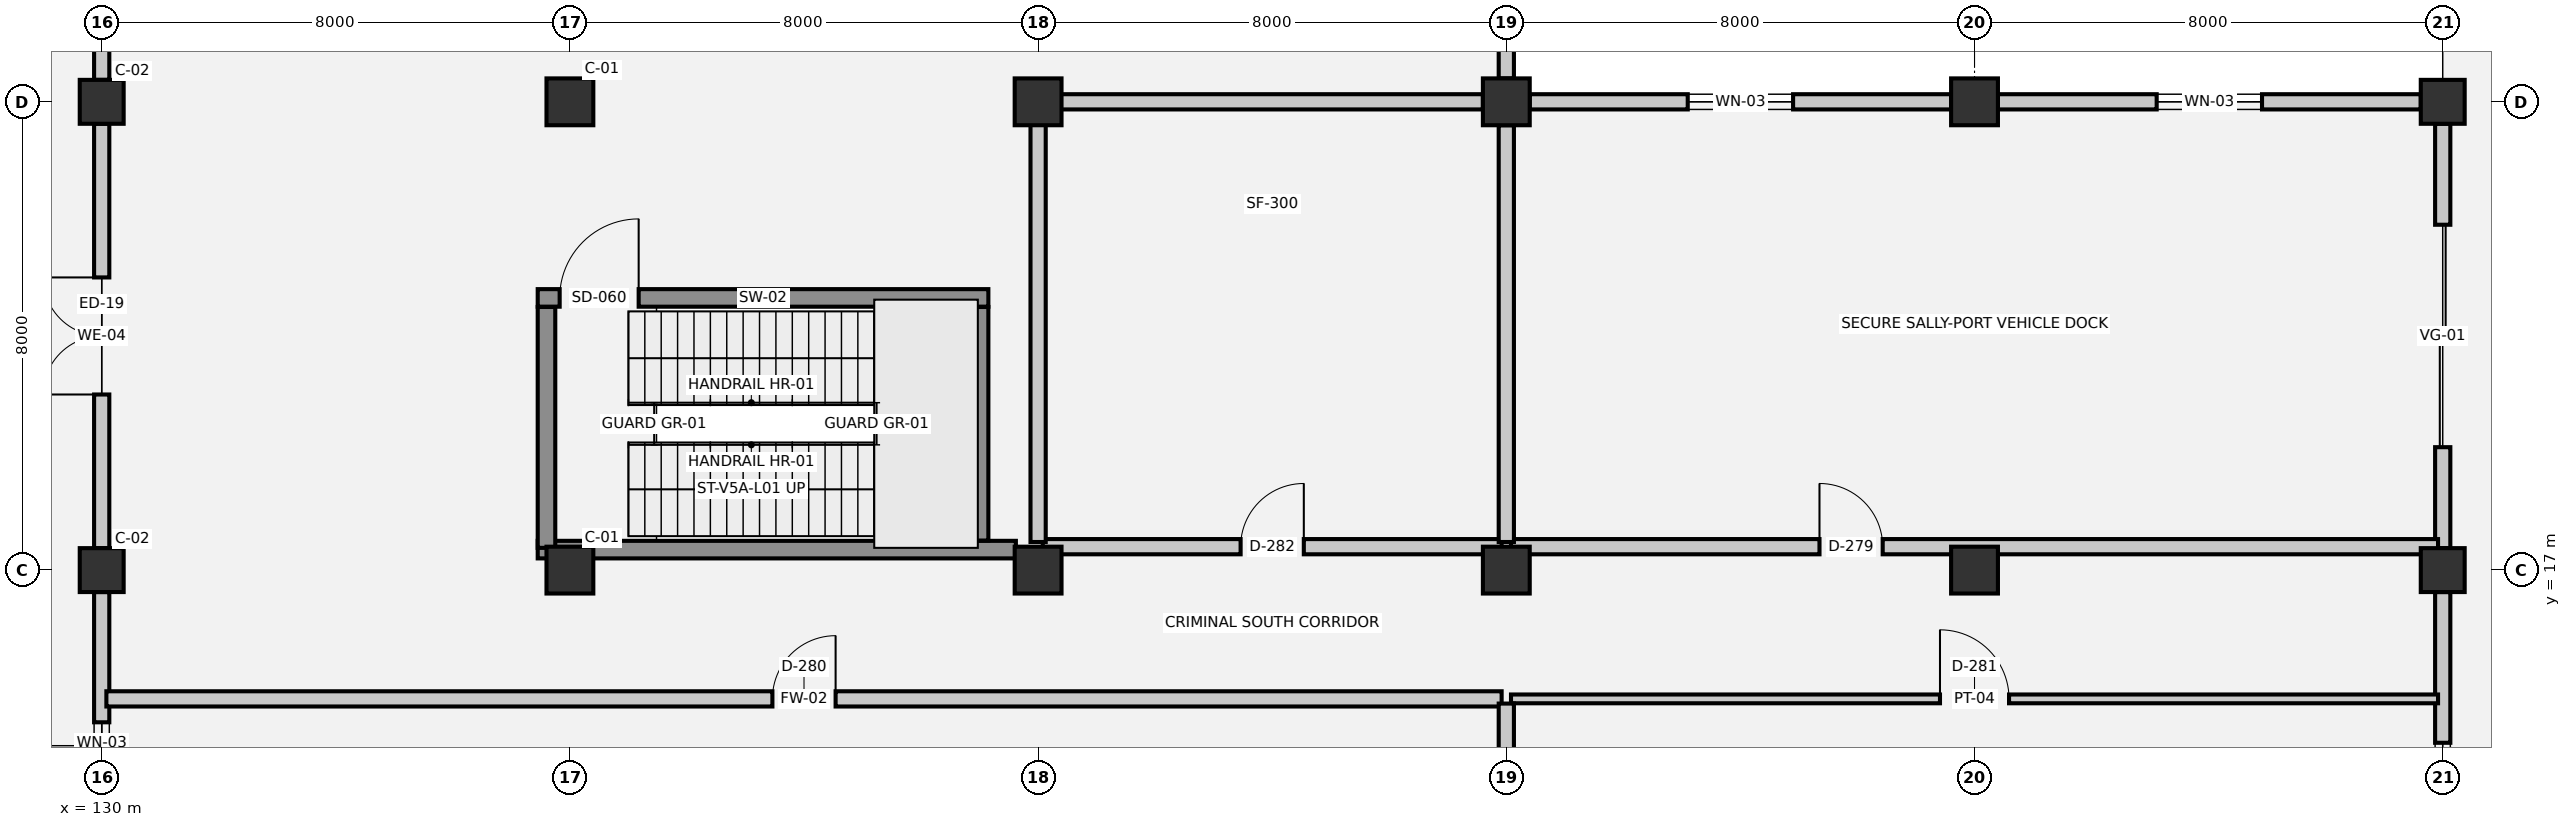
"""IFC4 building model, lengths in metres.
Left out: names, types, materials, properties, quantities, classifications, styles, units other than length and angle.
Written with IfcOpenShell. Run it as: python <this file> out.ifc"""

import sys

from ifc_helpers import new_model, si_unit, direction, frame, frame_2d, origin, origin_2d, place, context, subcontext, project, spatial, rectangle, extrude, element, fill, save


model = new_model("IFC4")
c1 = context("Model", 3, precision=1e-05, world=origin(), true_north=direction((0.0, 1.0)))
c2 = subcontext(c1, "Body", "Model", "MODEL_VIEW")
j1 = project(units=[si_unit("LENGTHUNIT", "METRE"), si_unit("PLANEANGLEUNIT", "RADIAN")], contexts=[c1])
p1 = place(None, origin())
s1 = spatial("IfcSite", under=j1, at=p1, CompositionType="ELEMENT")
p2 = place(p1, origin())
s2 = spatial("IfcBuilding", under=s1, at=p2, CompositionType="ELEMENT")
p3 = place(p2, origin())
s3 = spatial("IfcBuildingStorey", under=s2, at=p3, CompositionType="ELEMENT", Elevation=0.0)
for number, where, z_axis, x_axis in (
    (1, (130.0, 17.0, 0.0), (0.0, 0.0, 1.0), (1.0, 0.0, 0.0)),
    (2, (130.0, 25.0, 0.0), (0.0, 0.0, 1.0), (1.0, 0.0, 0.0)),
):
    element("IfcColumn", number, at=place(p3, frame(where, z_axis=z_axis, x_axis=x_axis)), inside=s3, PredefinedType="COLUMN", context=c2, shape_type="SweptSolid", body=[
        extrude(rectangle(XDim=0.75, YDim=0.75, at=origin_2d()), origin(), (0.0, 0.0, 1.0), 5.4),
    ])
for number, where, z_axis, x_axis in (
    (3, (138.0, 17.0, 0.0), (0.0, 0.0, 1.0), (1.0, 0.0, 0.0)),
    (4, (138.0, 25.0, 0.0), (0.0, 0.0, 1.0), (1.0, 0.0, 0.0)),
    (5, (146.0, 17.0, 0.0), (0.0, 0.0, 1.0), (1.0, 0.0, 0.0)),
    (6, (146.0, 25.0, 0.0), (0.0, 0.0, 1.0), (1.0, 0.0, 0.0)),
    (7, (154.0, 17.0, 0.0), (0.0, 0.0, 1.0), (1.0, 0.0, 0.0)),
    (8, (154.0, 25.0, 0.0), (0.0, 0.0, 1.0), (1.0, 0.0, 0.0)),
    (9, (162.0, 17.0, 0.0), (0.0, 0.0, 1.0), (1.0, 0.0, 0.0)),
    (10, (162.0, 25.0, 0.0), (0.0, 0.0, 1.0), (1.0, 0.0, 0.0)),
):
    element("IfcColumn", number, at=place(p3, frame(where, z_axis=z_axis, x_axis=x_axis)), inside=s3, PredefinedType="COLUMN", context=c2, shape_type="SweptSolid", body=[
        extrude(rectangle(XDim=0.8, YDim=0.8, at=origin_2d()), origin(), (0.0, 0.0, 1.0), 5.4),
    ])
for number, where, z_axis, x_axis in (
    (11, (170.0, 17.0, 0.0), (0.0, 0.0, 1.0), (1.0, 0.0, 0.0)),
    (12, (170.0, 25.0, 0.0), (0.0, 0.0, 1.0), (1.0, 0.0, 0.0)),
):
    element("IfcColumn", number, at=place(p3, frame(where, z_axis=z_axis, x_axis=x_axis)), inside=s3, PredefinedType="COLUMN", context=c2, shape_type="SweptSolid", body=[
        extrude(rectangle(XDim=0.75, YDim=0.75, at=origin_2d()), origin(), (0.0, 0.0, 1.0), 5.4),
    ])
p4 = place(p3, frame((130.0, 10.375, 0.0), z_axis=(0.0, 0.0, 1.0), x_axis=(0.0, 1.0, 0.0)))
e13 = element("IfcWall", 13, at=p4, inside=s3, PredefinedType="SOLIDWALL", context=c2, shape_type="SweptSolid", body=[
    extrude(rectangle(XDim=6.25, YDim=0.26, at=frame_2d((3.125, 0.0))), origin(), (0.0, 0.0, 1.0), 4.13),
])
p5 = place(p4, frame((2.225, 0.0, 0.9)))
e14 = element("IfcOpeningElement", 14, at=p5, cuts=e13, PredefinedType="OPENING", context=c2, shape_type="SweptSolid", body=[
    extrude(rectangle(XDim=1.8, YDim=2.0, at=frame_2d((0.9, 1.0))), frame((0.0, 0.14, 0.0), z_axis=(0.0, -1.0, 0.0), x_axis=(1.0, 0.0, 0.0)), (0.0, 0.0, 1.0), 0.28),
])
p6 = place(p3, frame((130.0, 17.375, 0.0), z_axis=(0.0, 0.0, 1.0), x_axis=(0.0, 1.0, 0.0)))
e15 = element("IfcWall", 15, at=p6, inside=s3, PredefinedType="SOLIDWALL", context=c2, shape_type="SweptSolid", body=[
    extrude(rectangle(XDim=7.25, YDim=0.26, at=frame_2d((3.625, 0.0))), origin(), (0.0, 0.0, 1.0), 4.13),
])
p7 = place(p6, frame((2.625, 0.0, 0.0)))
e16 = element("IfcOpeningElement", 16, at=p7, cuts=e15, PredefinedType="OPENING", context=c2, shape_type="SweptSolid", body=[
    extrude(rectangle(XDim=2.0, YDim=2.3, at=frame_2d((1.0, 1.15))), frame((0.0, 0.14, 0.0), z_axis=(0.0, -1.0, 0.0), x_axis=(1.0, 0.0, 0.0)), (0.0, 0.0, 1.0), 0.28),
])
p8 = place(p3, frame((130.0, 25.375, 0.0), z_axis=(0.0, 0.0, 1.0), x_axis=(0.0, 1.0, 0.0)))
e17 = element("IfcWall", 17, at=p8, inside=s3, PredefinedType="SOLIDWALL", context=c2, shape_type="SweptSolid", body=[
    extrude(rectangle(XDim=6.25, YDim=0.26, at=frame_2d((3.125, 0.0))), origin(), (0.0, 0.0, 1.0), 4.13),
])
p9 = place(p8, frame((2.225, 0.0, 0.9)))
e18 = element("IfcOpeningElement", 18, at=p9, cuts=e17, PredefinedType="OPENING", context=c2, shape_type="SweptSolid", body=[
    extrude(rectangle(XDim=1.8, YDim=2.0, at=frame_2d((0.9, 1.0))), frame((0.0, 0.14, 0.0), z_axis=(0.0, -1.0, 0.0), x_axis=(1.0, 0.0, 0.0)), (0.0, 0.0, 1.0), 0.28),
])
p10 = place(p3, frame((154.0, 31.6, 0.0), z_axis=(0.0, 0.0, 1.0), x_axis=(0.0, -1.0, 0.0)))
e19 = element("IfcWall", 19, at=p10, inside=s3, PredefinedType="SOLIDWALL", context=c2, shape_type="SweptSolid", body=[
    extrude(rectangle(XDim=6.2, YDim=0.26, at=frame_2d((3.1, 0.0))), origin(), (0.0, 0.0, 1.0), 4.13),
])
p11 = place(p10, frame((2.55, 0.0, 1.0)))
e20 = element("IfcOpeningElement", 20, at=p11, cuts=e19, PredefinedType="OPENING", context=c2, shape_type="SweptSolid", body=[
    extrude(rectangle(XDim=1.1, YDim=1.2, at=frame_2d((0.55, 0.6))), frame((0.0, 0.14, 0.0), z_axis=(0.0, -1.0, 0.0), x_axis=(1.0, 0.0, 0.0)), (0.0, 0.0, 1.0), 0.28),
])
p12 = place(p3, frame((154.4, 25.0, 0.0), z_axis=(0.0, 0.0, 1.0), x_axis=(1.0, 0.0, 0.0)))
e21 = element("IfcWall", 21, at=p12, inside=s3, PredefinedType="SOLIDWALL", context=c2, shape_type="SweptSolid", body=[
    extrude(rectangle(XDim=7.2, YDim=0.26, at=frame_2d((3.6, 0.0))), origin(), (0.0, 0.0, 1.0), 4.13),
])
p13 = place(p12, frame((2.7, 0.0, 0.9)))
e22 = element("IfcOpeningElement", 22, at=p13, cuts=e21, PredefinedType="OPENING", context=c2, shape_type="SweptSolid", body=[
    extrude(rectangle(XDim=1.8, YDim=2.0, at=frame_2d((0.9, 1.0))), frame((0.0, 0.14, 0.0), z_axis=(0.0, -1.0, 0.0), x_axis=(1.0, 0.0, 0.0)), (0.0, 0.0, 1.0), 0.28),
])
p14 = place(p3, frame((162.4, 25.0, 0.0), z_axis=(0.0, 0.0, 1.0), x_axis=(1.0, 0.0, 0.0)))
e23 = element("IfcWall", 23, at=p14, inside=s3, PredefinedType="SOLIDWALL", context=c2, shape_type="SweptSolid", body=[
    extrude(rectangle(XDim=7.225, YDim=0.26, at=frame_2d((3.613, 0.0))), origin(), (0.0, 0.0, 1.0), 4.13),
])
p15 = place(p14, frame((2.712, 0.0, 0.9)))
e24 = element("IfcOpeningElement", 24, at=p15, cuts=e23, PredefinedType="OPENING", context=c2, shape_type="SweptSolid", body=[
    extrude(rectangle(XDim=1.8, YDim=2.0, at=frame_2d((0.9, 1.0))), frame((0.0, 0.14, 0.0), z_axis=(0.0, -1.0, 0.0), x_axis=(1.0, 0.0, 0.0)), (0.0, 0.0, 1.0), 0.28),
])
p16 = place(p3, frame((170.0, 24.625, 0.0), z_axis=(0.0, 0.0, 1.0), x_axis=(0.0, -1.0, 0.0)))
e25 = element("IfcWall", 25, at=p16, inside=s3, PredefinedType="SOLIDWALL", context=c2, shape_type="SweptSolid", body=[
    extrude(rectangle(XDim=7.25, YDim=0.26, at=frame_2d((3.625, 0.0))), origin(), (0.0, 0.0, 1.0), 4.13),
])
p17 = place(p16, frame((1.725, 0.0, 0.0)))
e26 = element("IfcOpeningElement", 26, at=p17, cuts=e25, PredefinedType="OPENING", context=c2, shape_type="SweptSolid", body=[
    extrude(rectangle(XDim=3.8, YDim=3.6, at=frame_2d((1.9, 1.8))), frame((0.0, 0.14, 0.0), z_axis=(0.0, -1.0, 0.0), x_axis=(1.0, 0.0, 0.0)), (0.0, 0.0, 1.0), 0.28),
])
p18 = place(p3, frame((170.0, 16.625, 0.0), z_axis=(0.0, 0.0, 1.0), x_axis=(0.0, -1.0, 0.0)))
e27 = element("IfcWall", 27, at=p18, inside=s3, PredefinedType="SOLIDWALL", context=c2, shape_type="SweptSolid", body=[
    extrude(rectangle(XDim=6.25, YDim=0.26, at=frame_2d((3.125, 0.0))), origin(), (0.0, 0.0, 1.0), 4.13),
])
p19 = place(p18, frame((2.575, 0.0, 1.0)))
e28 = element("IfcOpeningElement", 28, at=p19, cuts=e27, PredefinedType="OPENING", context=c2, shape_type="SweptSolid", body=[
    extrude(rectangle(XDim=1.1, YDim=1.2, at=frame_2d((0.55, 0.6))), frame((0.0, 0.14, 0.0), z_axis=(0.0, -1.0, 0.0), x_axis=(1.0, 0.0, 0.0)), (0.0, 0.0, 1.0), 0.28),
])
p20 = place(p3, frame((137.45, 21.65, 0.0), z_axis=(0.0, 0.0, 1.0), x_axis=(1.0, 0.0, 0.0)))
e29 = element("IfcWall", 29, at=p20, inside=s3, PredefinedType="SHEAR", context=c2, shape_type="SweptSolid", body=[
    extrude(rectangle(XDim=7.7, YDim=0.3, at=frame_2d((3.85, 0.0))), origin(), (0.0, 0.0, 1.0), 5.1),
])
p21 = place(p20, frame((0.375, 0.0, 0.0)))
e30 = element("IfcOpeningElement", 30, at=p21, cuts=e29, PredefinedType="OPENING", context=c2, shape_type="SweptSolid", body=[
    extrude(rectangle(XDim=1.35, YDim=2.2, at=frame_2d((0.675, 1.1))), frame((0.0, 0.16, 0.0), z_axis=(0.0, -1.0, 0.0), x_axis=(1.0, 0.0, 0.0)), (0.0, 0.0, 1.0), 0.32),
])
p22 = place(p3, frame((137.45, 17.35, 0.0), z_axis=(0.0, 0.0, 1.0), x_axis=(1.0, 0.0, 0.0)))
e31 = element("IfcWall", 31, at=p22, inside=s3, PredefinedType="SHEAR", context=c2, shape_type="SweptSolid", body=[
    extrude(rectangle(XDim=8.17, YDim=0.3, at=frame_2d((4.085, 0.0))), origin(), (0.0, 0.0, 1.0), 5.1),
])
p23 = place(p3, frame((137.6, 21.495, 0.0), z_axis=(0.0, 0.0, 1.0), x_axis=(0.0, -1.0, 0.0)))
e32 = element("IfcWall", 32, at=p23, inside=s3, PredefinedType="SHEAR", context=c2, shape_type="SweptSolid", body=[
    extrude(rectangle(XDim=4.115, YDim=0.3, at=frame_2d((2.058, 0.0))), origin(), (0.0, 0.0, 1.0), 5.1),
])
p24 = place(p3, frame((145.0, 17.505, 0.0), z_axis=(0.0, 0.0, 1.0), x_axis=(0.0, 1.0, 0.0)))
e33 = element("IfcWall", 33, at=p24, inside=s3, PredefinedType="SHEAR", context=c2, shape_type="SweptSolid", body=[
    extrude(rectangle(XDim=3.99, YDim=0.3, at=frame_2d((1.995, 0.0))), origin(), (0.0, 0.0, 1.0), 5.1),
])
p25 = place(p3, frame((130.08, 14.8, 0.0), z_axis=(0.0, 0.0, 1.0), x_axis=(1.0, 0.0, 0.0)))
e34 = element("IfcWall", 34, at=p25, inside=s3, PredefinedType="SOLIDWALL", context=c2, shape_type="SweptSolid", body=[
    extrude(rectangle(XDim=23.84, YDim=0.26, at=frame_2d((11.92, 0.0))), origin(), (0.0, 0.0, 1.0), 5.04),
])
p26 = place(p25, frame((11.38, 0.0, 0.0)))
e35 = element("IfcOpeningElement", 35, at=p26, cuts=e34, PredefinedType="OPENING", context=c2, shape_type="SweptSolid", body=[
    extrude(rectangle(XDim=1.08, YDim=2.1, at=frame_2d((0.54, 1.05))), frame((0.0, 0.14, 0.0), z_axis=(0.0, -1.0, 0.0), x_axis=(1.0, 0.0, 0.0)), (0.0, 0.0, 1.0), 0.28),
])
p27 = place(p3, frame((154.08, 14.8, 0.0), z_axis=(0.0, 0.0, 1.0), x_axis=(1.0, 0.0, 0.0)))
e36 = element("IfcWall", 36, at=p27, inside=s3, PredefinedType="PARTITIONING", context=c2, shape_type="SweptSolid", body=[
    extrude(rectangle(XDim=15.84, YDim=0.15, at=frame_2d((7.92, 0.0))), origin(), (0.0, 0.0, 1.0), 5.04),
])
p28 = place(p27, frame((7.33, 0.0, 0.0)))
e37 = element("IfcOpeningElement", 37, at=p28, cuts=e36, PredefinedType="OPENING", context=c2, shape_type="SweptSolid", body=[
    extrude(rectangle(XDim=1.18, YDim=2.2, at=frame_2d((0.59, 1.1))), frame((0.0, 0.085, 0.0), z_axis=(0.0, -1.0, 0.0), x_axis=(1.0, 0.0, 0.0)), (0.0, 0.0, 1.0), 0.17),
])
p29 = place(p3, frame((146.08, 17.4, 0.0), z_axis=(0.0, 0.0, 1.0), x_axis=(1.0, 0.0, 0.0)))
e38 = element("IfcWall", 38, at=p29, inside=s3, PredefinedType="SOLIDWALL", context=c2, shape_type="SweptSolid", body=[
    extrude(rectangle(XDim=7.84, YDim=0.26, at=frame_2d((3.92, 0.0))), origin(), (0.0, 0.0, 1.0), 5.04),
])
p30 = place(p29, frame((3.38, 0.0, 0.0)))
e39 = element("IfcOpeningElement", 39, at=p30, cuts=e38, PredefinedType="OPENING", context=c2, shape_type="SweptSolid", body=[
    extrude(rectangle(XDim=1.08, YDim=2.1, at=frame_2d((0.54, 1.05))), frame((0.0, 0.14, 0.0), z_axis=(0.0, -1.0, 0.0), x_axis=(1.0, 0.0, 0.0)), (0.0, 0.0, 1.0), 0.28),
])
p31 = place(p3, frame((154.08, 17.4, 0.0), z_axis=(0.0, 0.0, 1.0), x_axis=(1.0, 0.0, 0.0)))
e40 = element("IfcWall", 40, at=p31, inside=s3, PredefinedType="SOLIDWALL", context=c2, shape_type="SweptSolid", body=[
    extrude(rectangle(XDim=15.84, YDim=0.26, at=frame_2d((7.92, 0.0))), origin(), (0.0, 0.0, 1.0), 5.04),
])
p32 = place(p31, frame((5.271, 0.0, 0.0)))
e41 = element("IfcOpeningElement", 41, at=p32, cuts=e40, PredefinedType="OPENING", context=c2, shape_type="SweptSolid", body=[
    extrude(rectangle(XDim=1.08, YDim=2.1, at=frame_2d((0.54, 1.05))), frame((0.0, 0.14, 0.0), z_axis=(0.0, -1.0, 0.0), x_axis=(1.0, 0.0, 0.0)), (0.0, 0.0, 1.0), 0.28),
])
p33 = place(p3, frame((146.08, 25.0, 0.0), z_axis=(0.0, 0.0, 1.0), x_axis=(1.0, 0.0, 0.0)))
e42 = element("IfcWall", 42, at=p33, inside=s3, PredefinedType="SOLIDWALL", context=c2, shape_type="SweptSolid", body=[
    extrude(rectangle(XDim=7.52, YDim=0.26, at=frame_2d((3.76, 0.0))), origin(), (0.0, 0.0, 1.0), 4.35),
])
p34 = place(p3, frame((146.0, 17.48, 0.0), z_axis=(0.0, 0.0, 1.0), x_axis=(0.0, 1.0, 0.0)))
e43 = element("IfcWall", 43, at=p34, inside=s3, PredefinedType="SOLIDWALL", context=c2, shape_type="SweptSolid", body=[
    extrude(rectangle(XDim=7.44, YDim=0.26, at=frame_2d((3.72, 0.0))), origin(), (0.0, 0.0, 1.0), 4.2),
])
p35 = place(p3, frame((154.0, 4.08, 0.0), z_axis=(0.0, 0.0, 1.0), x_axis=(0.0, 1.0, 0.0)))
e44 = element("IfcWall", 44, at=p35, inside=s3, PredefinedType="SOLIDWALL", context=c2, shape_type="SweptSolid", body=[
    extrude(rectangle(XDim=10.64, YDim=0.26, at=frame_2d((5.32, 0.0))), origin(), (0.0, 0.0, 1.0), 4.45),
])
p36 = place(p3, frame((154.0, 17.48, 0.0), z_axis=(0.0, 0.0, 1.0), x_axis=(0.0, 1.0, 0.0)))
e45 = element("IfcWall", 45, at=p36, inside=s3, PredefinedType="SOLIDWALL", context=c2, shape_type="SweptSolid", body=[
    extrude(rectangle(XDim=7.12, YDim=0.26, at=frame_2d((3.56, 0.0))), origin(), (0.0, 0.0, 1.0), 4.2),
])
p37 = place(p5, origin())
e46 = element("IfcWindow", 46, at=p37, inside=s3, PartitioningType="SINGLE_PANEL", PredefinedType="WINDOW", context=c2, shape_type="SweptSolid", body=[
    extrude(rectangle(XDim=1.8, YDim=2.0, at=frame_2d((0.9, 1.0))), frame((0.0, 0.03, 0.0), z_axis=(0.0, -1.0, 0.0), x_axis=(1.0, 0.0, 0.0)), (0.0, 0.0, 1.0), 0.06),
])
fill(e14, e46)
p38 = place(p7, origin())
e47 = element("IfcDoor", 47, at=p38, inside=s3, OperationType="DOUBLE_DOOR_SINGLE_SWING", PredefinedType="DOOR", context=c2, shape_type="SweptSolid", body=[
    extrude(rectangle(XDim=2.0, YDim=2.3, at=frame_2d((1.0, 1.15))), frame((0.0, 0.025, 0.0), z_axis=(0.0, -1.0, 0.0), x_axis=(1.0, 0.0, 0.0)), (0.0, 0.0, 1.0), 0.05),
])
fill(e16, e47)
p39 = place(p13, origin())
e48 = element("IfcWindow", 48, at=p39, inside=s3, PartitioningType="SINGLE_PANEL", PredefinedType="WINDOW", context=c2, shape_type="SweptSolid", body=[
    extrude(rectangle(XDim=1.8, YDim=2.0, at=frame_2d((0.9, 1.0))), frame((0.0, 0.03, 0.0), z_axis=(0.0, -1.0, 0.0), x_axis=(1.0, 0.0, 0.0)), (0.0, 0.0, 1.0), 0.06),
])
fill(e22, e48)
p40 = place(p15, origin())
e49 = element("IfcWindow", 49, at=p40, inside=s3, PartitioningType="SINGLE_PANEL", PredefinedType="WINDOW", context=c2, shape_type="SweptSolid", body=[
    extrude(rectangle(XDim=1.8, YDim=2.0, at=frame_2d((0.9, 1.0))), frame((0.0, 0.03, 0.0), z_axis=(0.0, -1.0, 0.0), x_axis=(1.0, 0.0, 0.0)), (0.0, 0.0, 1.0), 0.06),
])
fill(e24, e49)
p41 = place(p17, origin())
e50 = element("IfcDoor", 50, at=p41, inside=s3, OperationType="DOUBLE_DOOR_SLIDING", PredefinedType="GATE", context=c2, shape_type="SweptSolid", body=[
    extrude(rectangle(XDim=3.8, YDim=3.6, at=frame_2d((1.9, 1.8))), frame((0.0, 0.025, 0.0), z_axis=(0.0, -1.0, 0.0), x_axis=(1.0, 0.0, 0.0)), (0.0, 0.0, 1.0), 0.05),
])
fill(e26, e50)
p42 = place(p19, origin())
e51 = element("IfcWindow", 51, at=p42, inside=s3, PartitioningType="SINGLE_PANEL", PredefinedType="WINDOW", context=c2, shape_type="SweptSolid", body=[
    extrude(rectangle(XDim=1.1, YDim=1.2, at=frame_2d((0.55, 0.6))), frame((0.0, 0.03, 0.0), z_axis=(0.0, -1.0, 0.0), x_axis=(1.0, 0.0, 0.0)), (0.0, 0.0, 1.0), 0.06),
])
fill(e28, e51)
p43 = place(p21, origin())
e52 = element("IfcDoor", 52, at=p43, inside=s3, OperationType="SINGLE_SWING_RIGHT", PredefinedType="DOOR", context=c2, shape_type="SweptSolid", body=[
    extrude(rectangle(XDim=1.35, YDim=2.2, at=frame_2d((0.675, 1.1))), frame((0.0, 0.025, 0.0), z_axis=(0.0, -1.0, 0.0), x_axis=(1.0, 0.0, 0.0)), (0.0, 0.0, 1.0), 0.05),
])
fill(e30, e52)
p44 = place(p32, origin())
e53 = element("IfcDoor", 53, at=p44, inside=s3, OperationType="SINGLE_SWING_LEFT", PredefinedType="DOOR", context=c2, shape_type="SweptSolid", body=[
    extrude(rectangle(XDim=1.08, YDim=2.1, at=frame_2d((0.54, 1.05))), frame((0.0, 0.025, 0.0), z_axis=(0.0, -1.0, 0.0), x_axis=(1.0, 0.0, 0.0)), (0.0, 0.0, 1.0), 0.05),
])
fill(e41, e53)
p45 = place(p26, origin())
e54 = element("IfcDoor", 54, at=p45, inside=s3, OperationType="SINGLE_SWING_RIGHT", PredefinedType="DOOR", context=c2, shape_type="SweptSolid", body=[
    extrude(rectangle(XDim=1.08, YDim=2.1, at=frame_2d((0.54, 1.05))), frame((0.0, 0.025, 0.0), z_axis=(0.0, -1.0, 0.0), x_axis=(1.0, 0.0, 0.0)), (0.0, 0.0, 1.0), 0.05),
])
fill(e35, e54)
p46 = place(p28, origin())
e55 = element("IfcDoor", 55, at=p46, inside=s3, OperationType="SINGLE_SWING_LEFT", PredefinedType="DOOR", context=c2, shape_type="SweptSolid", body=[
    extrude(rectangle(XDim=1.18, YDim=2.2, at=frame_2d((0.59, 1.1))), frame((0.0, 0.025, 0.0), z_axis=(0.0, -1.0, 0.0), x_axis=(1.0, 0.0, 0.0)), (0.0, 0.0, 1.0), 0.05),
])
fill(e37, e55)
p47 = place(p30, origin())
e56 = element("IfcDoor", 56, at=p47, inside=s3, OperationType="SINGLE_SWING_RIGHT", PredefinedType="DOOR", context=c2, shape_type="SweptSolid", body=[
    extrude(rectangle(XDim=1.08, YDim=2.1, at=frame_2d((0.54, 1.05))), frame((0.0, 0.025, 0.0), z_axis=(0.0, -1.0, 0.0), x_axis=(1.0, 0.0, 0.0)), (0.0, 0.0, 1.0), 0.05),
])
fill(e39, e56)
save(model, sys.argv[1])
